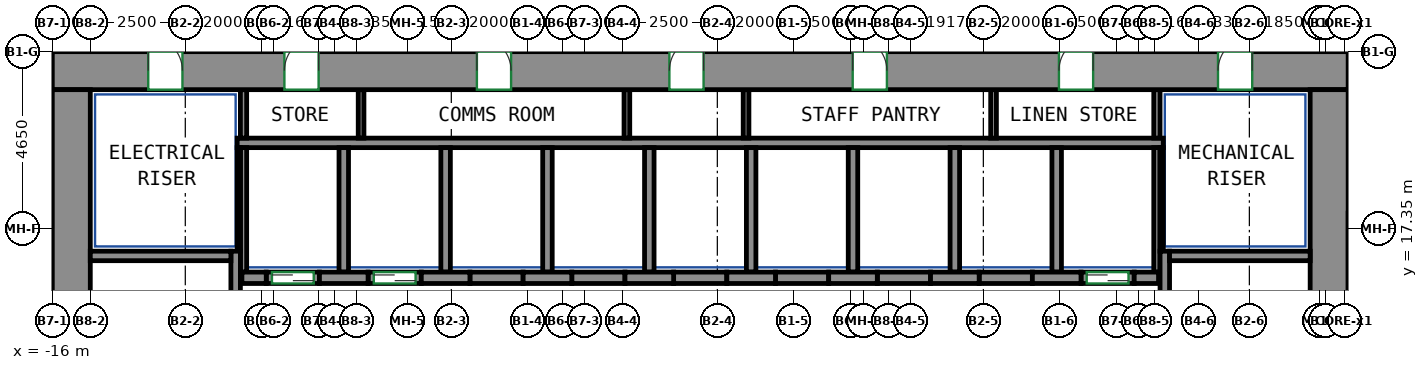
"""IFC4 building model, lengths in metres.
Left out: names, types, materials, properties, quantities, classifications, styles, units other than length and angle.
Written with IfcOpenShell. Run it as: python <this file> out.ifc"""

import sys

from ifc_helpers import new_model, si_unit, direction, frame, frame_2d, origin, place, context, subcontext, project, spatial, rectangle, extrude, source, transform, mapped, element, fill, save


model = new_model("IFC4")
c1 = context("Model", 3, precision=1e-05, world=origin(), true_north=direction((0.0, 1.0)))
c2 = subcontext(c1, "Body", "Model", "MODEL_VIEW")
j1 = project(units=[si_unit("LENGTHUNIT", "METRE"), si_unit("PLANEANGLEUNIT", "RADIAN")], contexts=[c1])
p1 = place(None, origin())
s1 = spatial("IfcSite", under=j1, at=p1, CompositionType="ELEMENT")
p2 = place(p1, origin())
s2 = spatial("IfcBuilding", under=s1, at=p2, CompositionType="ELEMENT")
p3 = place(p2, frame((0.0, 0.0, 87.2)))
s3 = spatial("IfcBuildingStorey", under=s2, at=p3, CompositionType="ELEMENT", Elevation=87.2)
m1 = source(origin(), c2, "Body", "SweptSolid", [
    extrude(rectangle(XDim=34.1, YDim=1.0, at=frame_2d((17.05, 0.0))), origin(), (0.0, 0.0, 1.0), 3.72),
])
p4 = place(p3, frame((-16.0, 21.5, 0.0), z_axis=(0.0, 0.0, 1.0), x_axis=(1.0, 0.0, 0.0)))
e1 = element("IfcWall", 1, at=p4, inside=s3, PredefinedType="SHEAR", context=c2, shape_type="MappedRepresentation", body=[
    mapped(m1, transform((0.0, 0.0, 0.0))),
])
p5 = place(p4, frame((6.108, 0.0, 0.0)))
e2 = element("IfcOpeningElement", 2, at=p5, cuts=e1, PredefinedType="OPENING", context=c2, shape_type="SweptSolid", body=[
    extrude(rectangle(XDim=0.9, YDim=2.1, at=frame_2d((0.45, 1.05))), frame((0.0, 0.51, 0.0), z_axis=(0.0, -1.0, 0.0), x_axis=(1.0, 0.0, 0.0)), (0.0, 0.0, 1.0), 1.02),
])
p6 = place(p4, frame((11.173, 0.0, 0.0)))
e3 = element("IfcOpeningElement", 3, at=p6, cuts=e1, PredefinedType="OPENING", context=c2, shape_type="SweptSolid", body=[
    extrude(rectangle(XDim=0.9, YDim=2.1, at=frame_2d((0.45, 1.05))), frame((0.0, 0.51, 0.0), z_axis=(0.0, -1.0, 0.0), x_axis=(1.0, 0.0, 0.0)), (0.0, 0.0, 1.0), 1.02),
])
p7 = place(p4, frame((16.238, 0.0, 0.0)))
e4 = element("IfcOpeningElement", 4, at=p7, cuts=e1, PredefinedType="OPENING", context=c2, shape_type="SweptSolid", body=[
    extrude(rectangle(XDim=0.9, YDim=2.1, at=frame_2d((0.45, 1.05))), frame((0.0, 0.51, 0.0), z_axis=(0.0, -1.0, 0.0), x_axis=(1.0, 0.0, 0.0)), (0.0, 0.0, 1.0), 1.02),
])
p8 = place(p4, frame((21.062, 0.0, 0.0)))
e5 = element("IfcOpeningElement", 5, at=p8, cuts=e1, PredefinedType="OPENING", context=c2, shape_type="SweptSolid", body=[
    extrude(rectangle(XDim=0.9, YDim=2.1, at=frame_2d((0.45, 1.05))), frame((0.0, 0.51, 0.0), z_axis=(0.0, -1.0, 0.0), x_axis=(1.0, 0.0, 0.0)), (0.0, 0.0, 1.0), 1.02),
])
p9 = place(p4, frame((26.489, 0.0, 0.0)))
e6 = element("IfcOpeningElement", 6, at=p9, cuts=e1, PredefinedType="OPENING", context=c2, shape_type="SweptSolid", body=[
    extrude(rectangle(XDim=0.9, YDim=2.1, at=frame_2d((0.45, 1.05))), frame((0.0, 0.51, 0.0), z_axis=(0.0, -1.0, 0.0), x_axis=(1.0, 0.0, 0.0)), (0.0, 0.0, 1.0), 1.02),
])
p10 = place(p4, frame((2.525, 0.0, 0.0)))
e7 = element("IfcOpeningElement", 7, at=p10, cuts=e1, PredefinedType="OPENING", context=c2, shape_type="SweptSolid", body=[
    extrude(rectangle(XDim=0.9, YDim=2.1, at=frame_2d((0.45, 1.05))), frame((0.0, 0.51, 0.0), z_axis=(0.0, -1.0, 0.0), x_axis=(1.0, 0.0, 0.0)), (0.0, 0.0, 1.0), 1.02),
])
p11 = place(p4, frame((30.675, 0.0, 0.0)))
e8 = element("IfcOpeningElement", 8, at=p11, cuts=e1, PredefinedType="OPENING", context=c2, shape_type="SweptSolid", body=[
    extrude(rectangle(XDim=0.9, YDim=2.1, at=frame_2d((0.45, 1.05))), frame((0.0, 0.51, 0.0), z_axis=(0.0, -1.0, 0.0), x_axis=(1.0, 0.0, 0.0)), (0.0, 0.0, 1.0), 1.02),
])
m2 = source(origin(), c2, "Body", "SweptSolid", [
    extrude(rectangle(XDim=12.0, YDim=1.0, at=frame_2d((6.0, 0.0))), origin(), (0.0, 0.0, 1.0), 3.72),
])
for number, where, z_axis, x_axis in (
    (9, (-15.5, 9.0, 0.0), (0.0, 0.0, 1.0), (0.0, 1.0, 0.0)),
    (10, (17.6, 9.0, 0.0), (0.0, 0.0, 1.0), (0.0, 1.0, 0.0)),
):
    element("IfcWall", number, at=place(p3, frame(where, z_axis=z_axis, x_axis=x_axis)), inside=s3, PredefinedType="SHEAR", context=c2, shape_type="MappedRepresentation", body=[
        mapped(m2, transform((0.0, 0.0, 0.0))),
    ])
m3 = source(origin(), c2, "Body", "SweptSolid", [
    extrude(rectangle(XDim=7.75, YDim=0.25, at=frame_2d((3.875, 0.0))), origin(), (0.0, 0.0, 1.0), 3.72),
])
p12 = place(p3, frame((-11.175, 9.0, 0.0), z_axis=(0.0, 0.0, 1.0), x_axis=(0.0, 1.0, 0.0)))
e11 = element("IfcWall", 11, at=p12, inside=s3, PredefinedType="SHEAR", context=c2, shape_type="MappedRepresentation", body=[
    mapped(m3, transform((0.0, 0.0, 0.0))),
])
m4 = source(origin(), c2, "Body", "SweptSolid", [
    extrude(rectangle(XDim=3.7, YDim=0.25, at=frame_2d((1.85, 0.0))), origin(), (0.0, 0.0, 1.0), 3.72),
])
p13 = place(p3, frame((-15.0, 16.625, 0.0), z_axis=(0.0, 0.0, 1.0), x_axis=(1.0, 0.0, 0.0)))
e12 = element("IfcWall", 12, at=p13, inside=s3, PredefinedType="SHEAR", context=c2, shape_type="MappedRepresentation", body=[
    mapped(m4, transform((0.0, 0.0, 0.0))),
])
p14 = place(p3, frame((13.275, 9.0, 0.0), z_axis=(0.0, 0.0, 1.0), x_axis=(0.0, 1.0, 0.0)))
e13 = element("IfcWall", 13, at=p14, inside=s3, PredefinedType="SHEAR", context=c2, shape_type="MappedRepresentation", body=[
    mapped(m3, transform((0.0, 0.0, 0.0))),
])
m5 = source(origin(), c2, "Body", "SweptSolid", [
    extrude(rectangle(XDim=3.7, YDim=0.25, at=frame_2d((1.85, 0.0))), origin(), (0.0, 0.0, 1.0), 3.72),
])
p15 = place(p3, frame((13.4, 16.625, 0.0), z_axis=(0.0, 0.0, 1.0), x_axis=(1.0, 0.0, 0.0)))
e14 = element("IfcWall", 14, at=p15, inside=s3, PredefinedType="SHEAR", context=c2, shape_type="MappedRepresentation", body=[
    mapped(m5, transform((0.0, 0.0, 0.0))),
])
m6 = source(origin(), c2, "Body", "SweptSolid", [
    extrude(rectangle(XDim=0.64, YDim=0.3, at=frame_2d((0.32, 0.0))), origin(), (0.0, 0.0, 1.0), 3.72),
])
p16 = place(p3, frame((-11.01, 16.05, 0.0), z_axis=(0.0, 0.0, 1.0), x_axis=(1.0, 0.0, 0.0)))
e15 = element("IfcWall", 15, at=p16, inside=s3, PredefinedType="SHEAR", context=c2, shape_type="MappedRepresentation", body=[
    mapped(m6, transform((0.0, 0.0, 0.0))),
])
m7 = source(origin(), c2, "Body", "SweptSolid", [
    extrude(rectangle(XDim=1.28, YDim=0.3, at=frame_2d((0.64, 0.0))), origin(), (0.0, 0.0, 1.0), 3.72),
])
for number, where, z_axis, x_axis in (
    (16, (-8.97, 16.05, 0.0), (0.0, 0.0, 1.0), (1.0, 0.0, 0.0)),
    (17, (-6.29, 16.05, 0.0), (0.0, 0.0, 1.0), (1.0, 0.0, 0.0)),
    (18, (-3.61, 16.05, 0.0), (0.0, 0.0, 1.0), (1.0, 0.0, 0.0)),
    (19, (-0.93, 16.05, 0.0), (0.0, 0.0, 1.0), (1.0, 0.0, 0.0)),
    (20, (1.75, 16.05, 0.0), (0.0, 0.0, 1.0), (1.0, 0.0, 0.0)),
    (21, (4.43, 16.05, 0.0), (0.0, 0.0, 1.0), (1.0, 0.0, 0.0)),
):
    element("IfcWall", number, at=place(p3, frame(where, z_axis=z_axis, x_axis=x_axis)), inside=s3, PredefinedType="SHEAR", context=c2, shape_type="MappedRepresentation", body=[
        mapped(m7, transform((0.0, 0.0, 0.0))),
    ])
m8 = source(origin(), c2, "Body", "SweptSolid", [
    extrude(rectangle(XDim=1.28, YDim=0.3, at=frame_2d((0.64, 0.0))), origin(), (0.0, 0.0, 1.0), 3.72),
])
p17 = place(p3, frame((7.11, 16.05, 0.0), z_axis=(0.0, 0.0, 1.0), x_axis=(1.0, 0.0, 0.0)))
e22 = element("IfcWall", 22, at=p17, inside=s3, PredefinedType="SHEAR", context=c2, shape_type="MappedRepresentation", body=[
    mapped(m8, transform((0.0, 0.0, 0.0))),
])
p18 = place(p3, frame((9.79, 16.05, 0.0), z_axis=(0.0, 0.0, 1.0), x_axis=(1.0, 0.0, 0.0)))
e23 = element("IfcWall", 23, at=p18, inside=s3, PredefinedType="SHEAR", context=c2, shape_type="MappedRepresentation", body=[
    mapped(m7, transform((0.0, 0.0, 0.0))),
])
m9 = source(origin(), c2, "Body", "SweptSolid", [
    extrude(rectangle(XDim=0.64, YDim=0.3, at=frame_2d((0.32, 0.0))), origin(), (0.0, 0.0, 1.0), 3.72),
])
p19 = place(p3, frame((12.47, 16.05, 0.0), z_axis=(0.0, 0.0, 1.0), x_axis=(1.0, 0.0, 0.0)))
e24 = element("IfcWall", 24, at=p19, inside=s3, PredefinedType="SHEAR", context=c2, shape_type="MappedRepresentation", body=[
    mapped(m9, transform((0.0, 0.0, 0.0))),
])
m10 = source(origin(), c2, "Body", "SweptSolid", [
    extrude(rectangle(XDim=1.4, YDim=0.3, at=frame_2d((0.7, 0.0))), origin(), (0.0, 0.0, 1.0), 3.72),
])
p20 = place(p3, frame((11.07, 16.05, 0.0), z_axis=(0.0, 0.0, 1.0), x_axis=(1.0, 0.0, 0.0)))
e25 = element("IfcWall", 25, at=p20, inside=s3, PredefinedType="PARTITIONING", context=c2, shape_type="MappedRepresentation", body=[
    mapped(m10, transform((0.0, 0.0, 0.0))),
])
p21 = place(p20, frame((0.15, 0.0, 0.0)))
e26 = element("IfcOpeningElement", 26, at=p21, cuts=e25, PredefinedType="OPENING", context=c2, shape_type="SweptSolid", body=[
    extrude(rectangle(XDim=1.1, YDim=2.1, at=frame_2d((0.55, 1.05))), frame((0.0, 0.16, 0.0), z_axis=(0.0, -1.0, 0.0), x_axis=(1.0, 0.0, 0.0)), (0.0, 0.0, 1.0), 0.32),
])
m11 = source(origin(), c2, "Body", "SweptSolid", [
    extrude(rectangle(XDim=1.4, YDim=0.3, at=frame_2d((0.7, 0.0))), origin(), (0.0, 0.0, 1.0), 3.72),
])
p22 = place(p3, frame((-10.37, 16.05, 0.0), z_axis=(0.0, 0.0, 1.0), x_axis=(1.0, 0.0, 0.0)))
e27 = element("IfcWall", 27, at=p22, inside=s3, PredefinedType="PARTITIONING", context=c2, shape_type="MappedRepresentation", body=[
    mapped(m11, transform((0.0, 0.0, 0.0))),
])
p23 = place(p22, frame((0.15, 0.0, 0.0)))
e28 = element("IfcOpeningElement", 28, at=p23, cuts=e27, PredefinedType="OPENING", context=c2, shape_type="SweptSolid", body=[
    extrude(rectangle(XDim=1.1, YDim=2.1, at=frame_2d((0.55, 1.05))), frame((0.0, 0.16, 0.0), z_axis=(0.0, -1.0, 0.0), x_axis=(1.0, 0.0, 0.0)), (0.0, 0.0, 1.0), 0.32),
])
p24 = place(p3, frame((-7.69, 16.05, 0.0), z_axis=(0.0, 0.0, 1.0), x_axis=(1.0, 0.0, 0.0)))
e29 = element("IfcWall", 29, at=p24, inside=s3, PredefinedType="PARTITIONING", context=c2, shape_type="MappedRepresentation", body=[
    mapped(m10, transform((0.0, 0.0, 0.0))),
])
p25 = place(p24, frame((0.15, 0.0, 0.0)))
e30 = element("IfcOpeningElement", 30, at=p25, cuts=e29, PredefinedType="OPENING", context=c2, shape_type="SweptSolid", body=[
    extrude(rectangle(XDim=1.1, YDim=2.1, at=frame_2d((0.55, 1.05))), frame((0.0, 0.16, 0.0), z_axis=(0.0, -1.0, 0.0), x_axis=(1.0, 0.0, 0.0)), (0.0, 0.0, 1.0), 0.32),
])
p26 = place(p3, frame((-5.01, 16.05, 0.0), z_axis=(0.0, 0.0, 1.0), x_axis=(1.0, 0.0, 0.0)))
e31 = element("IfcWall", 31, at=p26, inside=s3, PredefinedType="PARTITIONING", context=c2, shape_type="MappedRepresentation", body=[
    mapped(m10, transform((0.0, 0.0, 0.0))),
])
p27 = place(p3, frame((-2.33, 16.05, 0.0), z_axis=(0.0, 0.0, 1.0), x_axis=(1.0, 0.0, 0.0)))
e32 = element("IfcWall", 32, at=p27, inside=s3, PredefinedType="PARTITIONING", context=c2, shape_type="MappedRepresentation", body=[
    mapped(m11, transform((0.0, 0.0, 0.0))),
])
for number, where, z_axis, x_axis in (
    (33, (0.35, 16.05, 0.0), (0.0, 0.0, 1.0), (1.0, 0.0, 0.0)),
    (34, (3.03, 16.05, 0.0), (0.0, 0.0, 1.0), (1.0, 0.0, 0.0)),
):
    element("IfcWall", number, at=place(p3, frame(where, z_axis=z_axis, x_axis=x_axis)), inside=s3, PredefinedType="PARTITIONING", context=c2, shape_type="MappedRepresentation", body=[
        mapped(m10, transform((0.0, 0.0, 0.0))),
    ])
for number, where, z_axis, x_axis in (
    (35, (5.71, 16.05, 0.0), (0.0, 0.0, 1.0), (1.0, 0.0, 0.0)),
    (36, (8.39, 16.05, 0.0), (0.0, 0.0, 1.0), (1.0, 0.0, 0.0)),
):
    element("IfcWall", number, at=place(p3, frame(where, z_axis=z_axis, x_axis=x_axis)), inside=s3, PredefinedType="PARTITIONING", context=c2, shape_type="MappedRepresentation", body=[
        mapped(m11, transform((0.0, 0.0, 0.0))),
    ])
m12 = source(origin(), c2, "Body", "SweptSolid", [
    extrude(rectangle(XDim=24.37, YDim=0.25, at=frame_2d((12.185, 0.0))), origin(), (0.0, 0.0, 1.0), 3.72),
])
p28 = place(p3, frame((-11.135, 19.6, 0.0), z_axis=(0.0, 0.0, 1.0), x_axis=(1.0, 0.0, 0.0)))
e37 = element("IfcWall", 37, at=p28, inside=s3, PredefinedType="PARTITIONING", context=c2, shape_type="MappedRepresentation", body=[
    mapped(m12, transform((0.0, 0.0, 0.0))),
])
m13 = source(origin(), c2, "Body", "SweptSolid", [
    extrude(rectangle(XDim=3.275, YDim=0.165, at=frame_2d((1.638, 0.0))), origin(), (0.0, 0.0, 1.0), 3.72),
])
p29 = place(p3, frame((13.067, 16.2, 0.0), z_axis=(0.0, 0.0, 1.0), x_axis=(0.0, 1.0, 0.0)))
e38 = element("IfcWall", 38, at=p29, inside=s3, PredefinedType="PARTITIONING", context=c2, shape_type="MappedRepresentation", body=[
    mapped(m13, transform((0.0, 0.0, 0.0))),
])
m14 = source(origin(), c2, "Body", "SweptSolid", [
    extrude(rectangle(XDim=1.275, YDim=0.165, at=frame_2d((0.637, 0.0))), origin(), (0.0, 0.0, 1.0), 3.72),
])
p30 = place(p3, frame((13.067, 19.725, 0.0), z_axis=(0.0, 0.0, 1.0), x_axis=(0.0, 1.0, 0.0)))
e39 = element("IfcWall", 39, at=p30, inside=s3, PredefinedType="PARTITIONING", context=c2, shape_type="MappedRepresentation", body=[
    mapped(m14, transform((0.0, 0.0, 0.0))),
])
p31 = place(p3, frame((-10.968, 16.2, 0.0), z_axis=(0.0, 0.0, 1.0), x_axis=(0.0, 1.0, 0.0)))
e40 = element("IfcWall", 40, at=p31, inside=s3, PredefinedType="PARTITIONING", context=c2, shape_type="MappedRepresentation", body=[
    mapped(m13, transform((0.0, 0.0, 0.0))),
])
p32 = place(p3, frame((-10.968, 19.725, 0.0), z_axis=(0.0, 0.0, 1.0), x_axis=(0.0, 1.0, 0.0)))
e41 = element("IfcWall", 41, at=p32, inside=s3, PredefinedType="PARTITIONING", context=c2, shape_type="MappedRepresentation", body=[
    mapped(m14, transform((0.0, 0.0, 0.0))),
])
m15 = source(origin(), c2, "Body", "SweptSolid", [
    extrude(rectangle(XDim=3.275, YDim=0.25, at=frame_2d((1.638, 0.0))), origin(), (0.0, 0.0, 1.0), 3.72),
])
p33 = place(p3, frame((10.43, 16.2, 0.0), z_axis=(0.0, 0.0, 1.0), x_axis=(0.0, 1.0, 0.0)))
e42 = element("IfcWall", 42, at=p33, inside=s3, PredefinedType="PARTITIONING", context=c2, shape_type="MappedRepresentation", body=[
    mapped(m15, transform((0.0, 0.0, 0.0))),
])
m16 = source(origin(), c2, "Body", "SweptSolid", [
    extrude(rectangle(XDim=2.725, YDim=0.085, at=frame_2d((1.363, 0.0))), origin(), (0.0, 0.0, 1.0), 3.72),
])
p34 = place(p3, frame((13.192, 16.75, 0.0), z_axis=(0.0, 0.0, 1.0), x_axis=(0.0, 1.0, 0.0)))
e43 = element("IfcWall", 43, at=p34, inside=s3, PredefinedType="PARTITIONING", context=c2, shape_type="MappedRepresentation", body=[
    mapped(m16, transform((0.0, 0.0, 0.0))),
])
for number, where, z_axis, x_axis in (
    (44, (2.39, 16.2, 0.0), (0.0, 0.0, 1.0), (0.0, 1.0, 0.0)),
    (45, (5.07, 16.2, 0.0), (0.0, 0.0, 1.0), (0.0, 1.0, 0.0)),
    (46, (7.75, 16.2, 0.0), (0.0, 0.0, 1.0), (0.0, 1.0, 0.0)),
    (47, (-0.29, 16.2, 0.0), (0.0, 0.0, 1.0), (0.0, 1.0, 0.0)),
):
    element("IfcWall", number, at=place(p3, frame(where, z_axis=z_axis, x_axis=x_axis)), inside=s3, PredefinedType="PARTITIONING", context=c2, shape_type="MappedRepresentation", body=[
        mapped(m15, transform((0.0, 0.0, 0.0))),
    ])
p35 = place(p3, frame((-11.093, 16.75, 0.0), z_axis=(0.0, 0.0, 1.0), x_axis=(0.0, 1.0, 0.0)))
e48 = element("IfcWall", 48, at=p35, inside=s3, PredefinedType="PARTITIONING", context=c2, shape_type="MappedRepresentation", body=[
    mapped(m16, transform((0.0, 0.0, 0.0))),
])
for number, where, z_axis, x_axis in (
    (49, (-2.97, 16.2, 0.0), (0.0, 0.0, 1.0), (0.0, 1.0, 0.0)),
    (50, (-5.65, 16.2, 0.0), (0.0, 0.0, 1.0), (0.0, 1.0, 0.0)),
    (51, (-8.33, 16.2, 0.0), (0.0, 0.0, 1.0), (0.0, 1.0, 0.0)),
):
    element("IfcWall", number, at=place(p3, frame(where, z_axis=z_axis, x_axis=x_axis)), inside=s3, PredefinedType="PARTITIONING", context=c2, shape_type="MappedRepresentation", body=[
        mapped(m15, transform((0.0, 0.0, 0.0))),
    ])
m17 = source(origin(), c2, "Body", "SweptSolid", [
    extrude(rectangle(XDim=1.275, YDim=0.15, at=frame_2d((0.637, 0.0))), origin(), (0.0, 0.0, 1.0), 3.72),
])
for number, where, z_axis, x_axis in (
    (52, (-7.875, 19.725, 0.0), (0.0, 0.0, 1.0), (0.0, 1.0, 0.0)),
    (53, (-0.88, 19.725, 0.0), (0.0, 0.0, 1.0), (0.0, 1.0, 0.0)),
    (54, (2.256, 19.725, 0.0), (0.0, 0.0, 1.0), (0.0, 1.0, 0.0)),
    (55, (8.768, 19.725, 0.0), (0.0, 0.0, 1.0), (0.0, 1.0, 0.0)),
):
    element("IfcWall", number, at=place(p3, frame(where, z_axis=z_axis, x_axis=x_axis)), inside=s3, PredefinedType="PARTITIONING", context=c2, shape_type="MappedRepresentation", body=[
        mapped(m17, transform((0.0, 0.0, 0.0))),
    ])
p36 = place(p21, origin())
e56 = element("IfcDoor", 56, at=p36, inside=s3, OperationType="DOUBLE_DOOR_SLIDING", PredefinedType="DOOR", context=c2, shape_type="SweptSolid", body=[
    extrude(rectangle(XDim=1.1, YDim=2.1, at=frame_2d((0.55, 1.05))), frame((0.0, 0.025, 0.0), z_axis=(0.0, -1.0, 0.0), x_axis=(1.0, 0.0, 0.0)), (0.0, 0.0, 1.0), 0.05),
])
fill(e26, e56)
p37 = place(p23, origin())
e57 = element("IfcDoor", 57, at=p37, inside=s3, OperationType="DOUBLE_DOOR_SLIDING", PredefinedType="DOOR", context=c2, shape_type="SweptSolid", body=[
    extrude(rectangle(XDim=1.1, YDim=2.1, at=frame_2d((0.55, 1.05))), frame((0.0, 0.025, 0.0), z_axis=(0.0, -1.0, 0.0), x_axis=(1.0, 0.0, 0.0)), (0.0, 0.0, 1.0), 0.05),
])
fill(e28, e57)
p38 = place(p25, origin())
e58 = element("IfcDoor", 58, at=p38, inside=s3, OperationType="DOUBLE_DOOR_SLIDING", PredefinedType="DOOR", context=c2, shape_type="SweptSolid", body=[
    extrude(rectangle(XDim=1.1, YDim=2.1, at=frame_2d((0.55, 1.05))), frame((0.0, 0.025, 0.0), z_axis=(0.0, -1.0, 0.0), x_axis=(1.0, 0.0, 0.0)), (0.0, 0.0, 1.0), 0.05),
])
fill(e30, e58)
p39 = place(p5, origin())
e59 = element("IfcDoor", 59, at=p39, inside=s3, OperationType="SINGLE_SWING_RIGHT", PredefinedType="DOOR", context=c2, shape_type="SweptSolid", body=[
    extrude(rectangle(XDim=0.9, YDim=2.1, at=frame_2d((0.45, 1.05))), frame((0.0, -0.355, 0.0), z_axis=(0.0, -1.0, 0.0), x_axis=(1.0, 0.0, 0.0)), (0.0, 0.0, 1.0), 0.05),
])
fill(e2, e59)
p40 = place(p6, origin())
e60 = element("IfcDoor", 60, at=p40, inside=s3, OperationType="SINGLE_SWING_LEFT", PredefinedType="DOOR", context=c2, shape_type="SweptSolid", body=[
    extrude(rectangle(XDim=0.9, YDim=2.1, at=frame_2d((0.45, 1.05))), frame((0.0, -0.355, 0.0), z_axis=(0.0, -1.0, 0.0), x_axis=(1.0, 0.0, 0.0)), (0.0, 0.0, 1.0), 0.05),
])
fill(e3, e60)
p41 = place(p7, origin())
e61 = element("IfcDoor", 61, at=p41, inside=s3, OperationType="SINGLE_SWING_RIGHT", PredefinedType="DOOR", context=c2, shape_type="SweptSolid", body=[
    extrude(rectangle(XDim=0.9, YDim=2.1, at=frame_2d((0.45, 1.05))), frame((0.0, -0.355, 0.0), z_axis=(0.0, -1.0, 0.0), x_axis=(1.0, 0.0, 0.0)), (0.0, 0.0, 1.0), 0.05),
])
fill(e4, e61)
p42 = place(p8, origin())
e62 = element("IfcDoor", 62, at=p42, inside=s3, OperationType="SINGLE_SWING_LEFT", PredefinedType="DOOR", context=c2, shape_type="SweptSolid", body=[
    extrude(rectangle(XDim=0.9, YDim=2.1, at=frame_2d((0.45, 1.05))), frame((0.0, -0.355, 0.0), z_axis=(0.0, -1.0, 0.0), x_axis=(1.0, 0.0, 0.0)), (0.0, 0.0, 1.0), 0.05),
])
fill(e5, e62)
p43 = place(p9, origin())
e63 = element("IfcDoor", 63, at=p43, inside=s3, OperationType="SINGLE_SWING_RIGHT", PredefinedType="DOOR", context=c2, shape_type="SweptSolid", body=[
    extrude(rectangle(XDim=0.9, YDim=2.1, at=frame_2d((0.45, 1.05))), frame((0.0, -0.355, 0.0), z_axis=(0.0, -1.0, 0.0), x_axis=(1.0, 0.0, 0.0)), (0.0, 0.0, 1.0), 0.05),
])
fill(e6, e63)
p44 = place(p10, origin())
e64 = element("IfcDoor", 64, at=p44, inside=s3, OperationType="SINGLE_SWING_LEFT", PredefinedType="DOOR", context=c2, shape_type="SweptSolid", body=[
    extrude(rectangle(XDim=0.9, YDim=2.1, at=frame_2d((0.45, 1.05))), frame((0.0, -0.355, 0.0), z_axis=(0.0, -1.0, 0.0), x_axis=(1.0, 0.0, 0.0)), (0.0, 0.0, 1.0), 0.05),
])
fill(e7, e64)
p45 = place(p11, origin())
e65 = element("IfcDoor", 65, at=p45, inside=s3, OperationType="SINGLE_SWING_RIGHT", PredefinedType="DOOR", context=c2, shape_type="SweptSolid", body=[
    extrude(rectangle(XDim=0.9, YDim=2.1, at=frame_2d((0.45, 1.05))), frame((0.0, -0.355, 0.0), z_axis=(0.0, -1.0, 0.0), x_axis=(1.0, 0.0, 0.0)), (0.0, 0.0, 1.0), 0.05),
])
fill(e8, e65)
save(model, sys.argv[1])
